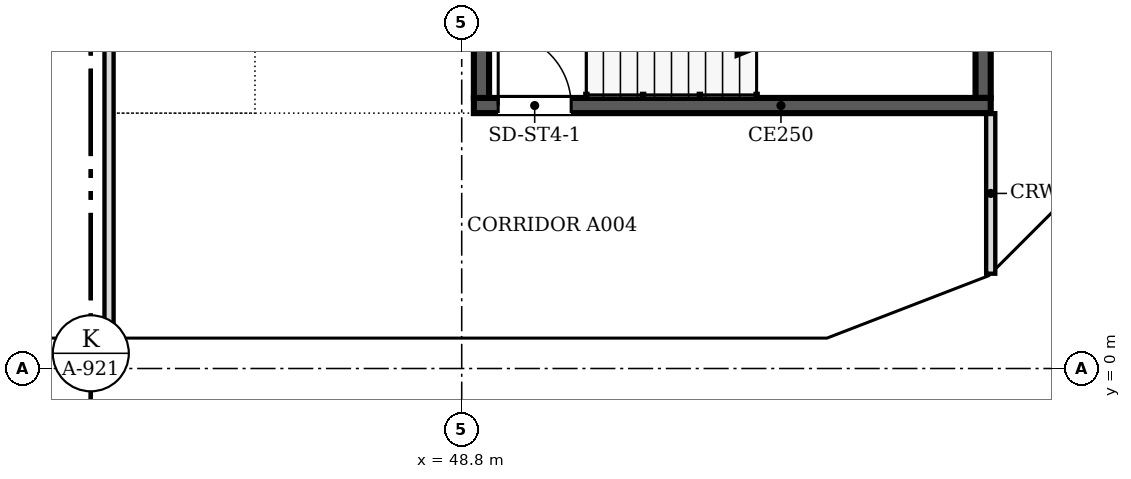
"""IFC4 building model, lengths in metres.
Left out: names, types, materials, properties, quantities, classifications, styles, units other than length and angle.
Written with IfcOpenShell. Run it as: python <this file> out.ifc"""

import sys

from ifc_helpers import new_model, si_unit, direction, frame, frame_2d, origin, place, context, subcontext, project, spatial, polyline, rectangle, outline, extrude, faceted_brep, source, transform, mapped, element, fill, save


model = new_model("IFC4")
c1 = context("Model", 3, precision=1e-05, world=origin(), true_north=direction((0.0, 1.0)))
c2 = subcontext(c1, "Body", "Model", "MODEL_VIEW")
j1 = project(units=[si_unit("LENGTHUNIT", "METRE"), si_unit("PLANEANGLEUNIT", "RADIAN")], contexts=[c1])
p1 = place(None, origin())
s1 = spatial("IfcSite", under=j1, at=p1, CompositionType="ELEMENT")
p2 = place(p1, origin())
s2 = spatial("IfcBuilding", under=s1, at=p2, CompositionType="ELEMENT")
p3 = place(p2, frame((0.0, 0.0, 91.4)))
s3 = spatial("IfcBuildingStorey", under=s2, at=p3, CompositionType="ELEMENT", Elevation=91.4)
m1 = source(origin(), c2, "Body", "SweptSolid", [
    extrude(outline(polyline([(3.05, 0.0), (6.1, 3.8), (3.05, 7.6), (0.0, 3.8), (3.05, 0.0)])), frame((0.0, 0.25, 0.0), z_axis=(0.0, -1.0, 0.0), x_axis=(1.0, 0.0, 0.0)), (0.0, 0.0, 1.0), 0.5),
])
p4 = place(p3, frame((39.65, 0.25, -3.8), z_axis=(0.0, 0.0, 1.0), x_axis=(1.0, 0.0, 0.0)))
e1 = element("IfcWall", 1, at=p4, inside=s3, PredefinedType="SOLIDWALL", context=c2, shape_type="MappedRepresentation", body=[
    mapped(m1, transform((0.0, 0.0, 0.0), scale=1.0)),
])
m2 = source(origin(), c2, "Body", "SweptSolid", [
    extrude(outline(polyline([(3.05, 0.399), (5.78, 3.8), (3.05, 7.2), (0.321, 3.8), (3.05, 0.399)])), frame((0.0, 0.26, 0.0), z_axis=(0.0, -1.0, 0.0), x_axis=(1.0, 0.0, 0.0)), (0.0, 0.0, 1.0), 0.52),
])
p5 = place(p4, origin())
e2 = element("IfcOpeningElement", 2, at=p5, cuts=e1, PredefinedType="OPENING", context=c2, shape_type="MappedRepresentation", body=[
    mapped(m2, transform((0.0, 0.0, 0.0), scale=1.0)),
])
p6 = place(p3, frame((45.75, 0.25, -3.8), z_axis=(0.0, 0.0, 1.0), x_axis=(1.0, 0.0, 0.0)))
e3 = element("IfcWall", 3, at=p6, inside=s3, PredefinedType="SOLIDWALL", context=c2, shape_type="MappedRepresentation", body=[
    mapped(m1, transform((0.0, 0.0, 0.0), scale=1.0)),
])
p7 = place(p6, origin())
e4 = element("IfcOpeningElement", 4, at=p7, cuts=e3, PredefinedType="OPENING", context=c2, shape_type="MappedRepresentation", body=[
    mapped(m2, transform((0.0, 0.0, 0.0), scale=1.0)),
])
m3 = source(origin(), c2, "Body", "Brep", [
    faceted_brep([(3.003, -0.25, 0.0), (3.05, -0.25, 0.06), (3.05, -0.25, 7.54), (3.003, -0.25, 7.6), (0.0, -0.25, 3.8), (0.0, 0.25, 3.8), (2.957, 0.25, 7.541), (2.957, 0.25, 0.059), (3.003, 0.0, 0.0), (3.003, 0.0, 7.6)], [[[0, 1, 2, 3, 4]], [[5, 6, 7]], [[1, 0, 8]], [[9, 3, 2]], [[6, 5, 4, 3, 9]], [[5, 7, 8, 0, 4]], [[1, 8, 7, 6, 9, 2]]]),
])
p8 = place(p3, frame((51.85, 0.25, -3.8), z_axis=(0.0, 0.0, 1.0), x_axis=(1.0, 0.0, 0.0)))
e5 = element("IfcWall", 5, at=p8, inside=s3, PredefinedType="SOLIDWALL", context=c2, shape_type="MappedRepresentation", body=[
    mapped(m3, transform((0.0, 0.0, 0.0), scale=1.0)),
])
m4 = source(origin(), c2, "Body", "SweptSolid", [
    extrude(outline(polyline([(2.803, 6.944), (0.319, 3.8), (2.803, 0.656), (2.803, 6.944)])), frame((0.0, 0.26, 0.0), z_axis=(0.0, -1.0, 0.0), x_axis=(1.0, 0.0, 0.0)), (0.0, 0.0, 1.0), 0.52),
])
p9 = place(p8, origin())
e6 = element("IfcOpeningElement", 6, at=p9, cuts=e5, PredefinedType="OPENING", context=c2, shape_type="MappedRepresentation", body=[
    mapped(m4, transform((0.0, 0.0, 0.0), scale=1.0)),
])
m5 = source(origin(), c2, "Body", "Brep", [
    faceted_brep([(0.047, -0.25, 0.0), (2.997, -0.25, 3.8), (0.047, -0.25, 7.6), (0.0, -0.25, 7.541), (0.0, -0.25, 0.059), (0.093, 0.25, 7.54), (2.944, 0.25, 3.868), (2.944, 0.25, 3.732), (0.093, 0.25, 0.06), (2.997, 0.0, 3.8), (0.047, 0.0, 0.0), (0.047, 0.0, 7.6)], [[[0, 1, 2, 3, 4]], [[5, 6, 7, 8]], [[8, 7, 9, 1, 0, 10]], [[6, 5, 11, 2, 1, 9]], [[3, 2, 11]], [[10, 0, 4]], [[8, 10, 4, 3, 11, 5]], [[9, 7, 6]]]),
])
p10 = place(p3, frame((54.81, 0.233, -3.8), z_axis=(0.0, 0.0, 1.0), x_axis=(0.932990326376, 0.359901446078, 0.0)))
e7 = element("IfcWall", 7, at=p10, inside=s3, PredefinedType="SOLIDWALL", context=c2, shape_type="MappedRepresentation", body=[
    mapped(m5, transform((0.0, 0.0, 0.0), scale=1.0)),
])
m6 = source(origin(), c2, "Body", "SweptSolid", [
    extrude(outline(polyline([(0.247, 0.665), (2.681, 3.8), (0.247, 6.935), (0.247, 0.665)])), frame((0.0, 0.26, 0.0), z_axis=(0.0, -1.0, 0.0), x_axis=(1.0, 0.0, 0.0)), (0.0, 0.0, 1.0), 0.52),
])
p11 = place(p10, origin())
e8 = element("IfcOpeningElement", 8, at=p11, cuts=e7, PredefinedType="OPENING", context=c2, shape_type="MappedRepresentation", body=[
    mapped(m6, transform((0.0, 0.0, 0.0), scale=1.0)),
])
m7 = source(origin(), c2, "Body", "Brep", [
    faceted_brep([(2.944, -0.25, 0.0), (2.997, -0.25, 0.068), (2.997, -0.25, 7.532), (2.944, -0.25, 7.6), (0.0, -0.25, 3.8), (0.053, 0.25, 3.868), (2.891, 0.25, 7.532), (2.891, 0.25, 0.068), (0.053, 0.25, 3.731), (2.944, 0.0, 0.0), (2.944, 0.0, 7.6), (0.0, 0.0, 3.8)], [[[0, 1, 2, 3, 4]], [[5, 6, 7, 8]], [[1, 0, 9]], [[10, 3, 2]], [[6, 5, 11, 4, 3, 10]], [[8, 7, 9, 0, 4, 11]], [[8, 11, 5]], [[1, 9, 7, 6, 10, 2]]]),
])
p12 = place(p3, frame((57.606, 1.312, -3.8), z_axis=(0.0, 0.0, 1.0), x_axis=(0.707147509625, 0.707066050402, 0.0)))
e9 = element("IfcWall", 9, at=p12, inside=s3, PredefinedType="SOLIDWALL", context=c2, shape_type="MappedRepresentation", body=[
    mapped(m7, transform((0.0, 0.0, 0.0), scale=1.0)),
])
m8 = source(origin(), c2, "Body", "SweptSolid", [
    extrude(outline(polyline([(2.744, 6.934), (0.316, 3.8), (2.744, 0.666), (2.744, 6.934)])), frame((0.0, 0.26, 0.0), z_axis=(0.0, -1.0, 0.0), x_axis=(1.0, 0.0, 0.0)), (0.0, 0.0, 1.0), 0.52),
])
p13 = place(p12, origin())
e10 = element("IfcOpeningElement", 10, at=p13, cuts=e9, PredefinedType="OPENING", context=c2, shape_type="MappedRepresentation", body=[
    mapped(m8, transform((0.0, 0.0, 0.0), scale=1.0)),
])
p14 = place(p2, frame((0.0, 0.0, 95.2)))
s4 = spatial("IfcBuildingStorey", under=s2, at=p14, CompositionType="ELEMENT", Elevation=95.2)
m9 = source(origin(), c2, "Body", "Brep", [
    faceted_brep([(3.05, -0.25, 0.0), (6.1, -0.25, 3.8), (6.1, -0.25, 3.8), (3.05, -0.25, 7.6), (0.0, -0.25, 3.8), (0.0, 0.25, 3.8), (3.05, 0.25, 7.6), (6.1, 0.25, 3.8), (6.1, 0.25, 3.8), (3.05, 0.25, 0.0)], [[[0, 1, 2, 3, 4]], [[5, 6, 7, 8, 9]], [[9, 8, 1, 0]], [[7, 6, 3, 2]], [[6, 5, 4, 3]], [[5, 9, 0, 4]], [[1, 8, 7, 2]]]),
])
p15 = place(p14, frame((36.6, 0.25, -3.8), z_axis=(0.0, 0.0, 1.0), x_axis=(1.0, 0.0, 0.0)))
e11 = element("IfcWall", 11, at=p15, inside=s4, PredefinedType="SOLIDWALL", context=c2, shape_type="MappedRepresentation", body=[
    mapped(m9, transform((0.0, 0.0, 0.0), scale=1.0)),
])
m10 = source(origin(), c2, "Body", "SweptSolid", [
    extrude(outline(polyline([(3.05, 0.399), (5.78, 3.8), (3.05, 7.201), (0.321, 3.8), (3.05, 0.399)])), frame((0.0, 0.26, 0.0), z_axis=(0.0, -1.0, 0.0), x_axis=(1.0, 0.0, 0.0)), (0.0, 0.0, 1.0), 0.52),
])
p16 = place(p15, origin())
e12 = element("IfcOpeningElement", 12, at=p16, cuts=e11, PredefinedType="OPENING", context=c2, shape_type="MappedRepresentation", body=[
    mapped(m10, transform((0.0, 0.0, 0.0), scale=1.0)),
])
m11 = source(origin(), c2, "Body", "SweptSolid", [
    extrude(outline(polyline([(3.05, 0.0), (6.1, 3.8), (3.05, 7.6), (0.0, 3.8), (3.05, 0.0)])), frame((0.0, 0.25, 0.0), z_axis=(0.0, -1.0, 0.0), x_axis=(1.0, 0.0, 0.0)), (0.0, 0.0, 1.0), 0.5),
])
p17 = place(p14, frame((42.7, 0.25, -3.8), z_axis=(0.0, 0.0, 1.0), x_axis=(1.0, 0.0, 0.0)))
e13 = element("IfcWall", 13, at=p17, inside=s4, PredefinedType="SOLIDWALL", context=c2, shape_type="MappedRepresentation", body=[
    mapped(m11, transform((0.0, 0.0, 0.0), scale=1.0)),
])
p18 = place(p17, origin())
e14 = element("IfcOpeningElement", 14, at=p18, cuts=e13, PredefinedType="OPENING", context=c2, shape_type="MappedRepresentation", body=[
    mapped(m10, transform((0.0, 0.0, 0.0), scale=1.0)),
])
m12 = source(origin(), c2, "Body", "Brep", [
    faceted_brep([(3.05, -0.25, 0.0), (6.053, -0.25, 3.8), (3.05, -0.25, 7.6), (0.0, -0.25, 3.8), (0.0, 0.25, 3.8), (3.05, 0.25, 7.6), (6.007, 0.25, 3.859), (6.007, 0.25, 3.741), (3.05, 0.25, 0.0), (6.053, 0.0, 3.8)], [[[0, 1, 2, 3]], [[4, 5, 6, 7, 8]], [[8, 7, 9, 1, 0]], [[6, 5, 2, 1, 9]], [[5, 4, 3, 2]], [[4, 8, 0, 3]], [[9, 7, 6]]]),
])
p19 = place(p14, frame((48.8, 0.25, -3.8), z_axis=(0.0, 0.0, 1.0), x_axis=(1.0, 0.0, 0.0)))
e15 = element("IfcWall", 15, at=p19, inside=s4, PredefinedType="SOLIDWALL", context=c2, shape_type="MappedRepresentation", body=[
    mapped(m12, transform((0.0, 0.0, 0.0), scale=1.0)),
])
m13 = source(origin(), c2, "Body", "SweptSolid", [
    extrude(outline(polyline([(3.049, 0.401), (5.735, 3.8), (3.049, 7.199), (0.321, 3.8), (3.049, 0.401)])), frame((0.0, 0.26, 0.0), z_axis=(0.0, -1.0, 0.0), x_axis=(1.0, 0.0, 0.0)), (0.0, 0.0, 1.0), 0.52),
])
p20 = place(p19, origin())
e16 = element("IfcOpeningElement", 16, at=p20, cuts=e15, PredefinedType="OPENING", context=c2, shape_type="MappedRepresentation", body=[
    mapped(m13, transform((0.0, 0.0, 0.0), scale=1.0)),
])
m14 = source(origin(), c2, "Body", "Brep", [
    faceted_brep([(2.95, -0.25, 0.0), (3.003, -0.25, 0.068), (3.003, -0.25, 7.532), (2.95, -0.25, 7.6), (0.0, -0.25, 3.8), (0.047, 0.25, 3.86), (2.898, 0.25, 7.532), (2.898, 0.25, 0.068), (0.047, 0.25, 3.74), (2.95, 0.0, 0.0), (2.95, 0.0, 7.6), (0.0, 0.0, 3.8)], [[[0, 1, 2, 3, 4]], [[5, 6, 7, 8]], [[1, 0, 9]], [[10, 3, 2]], [[6, 5, 11, 4, 3, 10]], [[8, 7, 9, 0, 4, 11]], [[8, 11, 5]], [[1, 9, 7, 6, 10, 2]]]),
])
p21 = place(p14, frame((54.854, 0.25, -3.8), z_axis=(0.0, 0.0, 1.0), x_axis=(0.932970071518, 0.359953949349, 0.0)))
e17 = element("IfcWall", 17, at=p21, inside=s4, PredefinedType="SOLIDWALL", context=c2, shape_type="MappedRepresentation", body=[
    mapped(m14, transform((0.0, 0.0, 0.0), scale=1.0)),
])
m15 = source(origin(), c2, "Body", "SweptSolid", [
    extrude(outline(polyline([(2.75, 6.935), (0.316, 3.8), (2.75, 0.665), (2.75, 6.935)])), frame((0.0, 0.26, 0.0), z_axis=(0.0, -1.0, 0.0), x_axis=(1.0, 0.0, 0.0)), (0.0, 0.0, 1.0), 0.52),
])
p22 = place(p21, origin())
e18 = element("IfcOpeningElement", 18, at=p22, cuts=e17, PredefinedType="OPENING", context=c2, shape_type="MappedRepresentation", body=[
    mapped(m15, transform((0.0, 0.0, 0.0), scale=1.0)),
])
m16 = source(origin(), c2, "Body", "Brep", [
    faceted_brep([(0.053, -0.25, 0.0), (2.997, -0.25, 3.8), (0.053, -0.25, 7.6), (0.0, -0.25, 7.532), (0.0, -0.25, 0.068), (0.106, 0.25, 7.532), (2.944, 0.25, 3.868), (2.944, 0.25, 3.732), (0.106, 0.25, 0.068), (2.997, 0.0, 3.8), (0.053, 0.0, 0.0), (0.053, 0.0, 7.6)], [[[0, 1, 2, 3, 4]], [[5, 6, 7, 8]], [[8, 7, 9, 1, 0, 10]], [[6, 5, 11, 2, 1, 9]], [[3, 2, 11]], [[10, 0, 4]], [[8, 10, 4, 3, 11, 5]], [[9, 7, 6]]]),
])
p23 = place(p14, frame((57.569, 1.274, -3.8), z_axis=(0.0, 0.0, 1.0), x_axis=(0.707066050402, 0.707147509625, 0.0)))
e19 = element("IfcWall", 19, at=p23, inside=s4, PredefinedType="SOLIDWALL", context=c2, shape_type="MappedRepresentation", body=[
    mapped(m16, transform((0.0, 0.0, 0.0), scale=1.0)),
])
m17 = source(origin(), c2, "Body", "SweptSolid", [
    extrude(outline(polyline([(0.253, 0.667), (2.681, 3.8), (0.253, 6.934), (0.253, 0.667)])), frame((0.0, 0.26, 0.0), z_axis=(0.0, -1.0, 0.0), x_axis=(1.0, 0.0, 0.0)), (0.0, 0.0, 1.0), 0.52),
])
p24 = place(p23, origin())
e20 = element("IfcOpeningElement", 20, at=p24, cuts=e19, PredefinedType="OPENING", context=c2, shape_type="MappedRepresentation", body=[
    mapped(m17, transform((0.0, 0.0, 0.0), scale=1.0)),
])
p25 = place(p3, frame((57.5, 4.325, 0.0), z_axis=(0.0, 0.0, 1.0), x_axis=(-1.0, 0.0, 0.0)))
e21 = element("IfcWall", 21, at=p25, inside=s3, PredefinedType="SOLIDWALL", context=c2, shape_type="SweptSolid", body=[
    extrude(rectangle(XDim=8.5, YDim=0.25, at=frame_2d((4.25, 0.0))), origin(), (0.0, 0.0, 1.0), 3.8),
])
m18 = source(origin(), c2, "Body", "SweptSolid", [
    extrude(rectangle(XDim=1.2, YDim=2.1, at=frame_2d((0.6, 1.05))), frame((0.0, 0.135, 0.0), z_axis=(0.0, -1.0, 0.0), x_axis=(1.0, 0.0, 0.0)), (0.0, 0.0, 1.0), 0.27),
])
p26 = place(p25, frame((6.9, 0.0, 0.0)))
e22 = element("IfcOpeningElement", 22, at=p26, cuts=e21, PredefinedType="OPENING", context=c2, shape_type="MappedRepresentation", body=[
    mapped(m18, transform((0.0, 0.0, 0.0), scale=1.0)),
])
for number, where, z_axis, x_axis in (
    (23, (49.125, 4.45, 0.0), (0.0, 0.0, 1.0), (0.0, 1.0, 0.0)),
    (24, (57.375, 7.85, 0.0), (0.0, 0.0, 1.0), (0.0, -1.0, 0.0)),
):
    element("IfcWall", number, at=place(p3, frame(where, z_axis=z_axis, x_axis=x_axis)), inside=s3, PredefinedType="SOLIDWALL", context=c2, shape_type="SweptSolid", body=[
        extrude(rectangle(XDim=3.4, YDim=0.25, at=frame_2d((1.7, 0.0))), origin(), (0.0, 0.0, 1.0), 3.8),
    ])
p27 = place(p3, frame((43.0, 0.5, 0.0), z_axis=(0.0, 0.0, 1.0), x_axis=(0.0, 1.0, 0.0)))
e25 = element("IfcWall", 25, at=p27, inside=s3, PredefinedType="PARTITIONING", context=c2, shape_type="SweptSolid", body=[
    extrude(rectangle(XDim=21.424, YDim=0.15, at=frame_2d((10.712, 0.0))), origin(), (0.0, 0.0, 1.0), 2.895),
])
m19 = source(origin(), c2, "Body", "SweptSolid", [
    extrude(rectangle(XDim=0.9, YDim=2.1, at=frame_2d((0.45, 1.05))), frame((0.0, 0.085, 0.0), z_axis=(0.0, -1.0, 0.0), x_axis=(1.0, 0.0, 0.0)), (0.0, 0.0, 1.0), 0.17),
])
p28 = place(p27, frame((16.601, 0.0, 0.0)))
e26 = element("IfcOpeningElement", 26, at=p28, cuts=e25, PredefinedType="OPENING", context=c2, shape_type="MappedRepresentation", body=[
    mapped(m19, transform((0.0, 0.0, 0.0), scale=1.0)),
])
p29 = place(p27, frame((7.7, 0.0, 0.0)))
e27 = element("IfcOpeningElement", 27, at=p29, cuts=e25, PredefinedType="OPENING", context=c2, shape_type="MappedRepresentation", body=[
    mapped(m19, transform((0.0, 0.0, 0.0), scale=1.0)),
])
p30 = place(p3, frame((57.5, 1.559, 0.0), z_axis=(0.0, 0.0, 1.0), x_axis=(0.0, 1.0, 0.0)))
e28 = element("IfcWall", 28, at=p30, inside=s3, PredefinedType="PARTITIONING", context=c2, shape_type="SweptSolid", body=[
    extrude(rectangle(XDim=2.641, YDim=0.15, at=frame_2d((1.32, 0.0))), origin(), (0.0, 0.0, 1.0), 2.895),
])
m20 = source(origin(), c2, "Body", "SweptSolid", [
    extrude(rectangle(XDim=1.2, YDim=2.1, at=frame_2d((0.6, 1.05))), frame((0.0, 0.025, 0.0), z_axis=(0.0, -1.0, 0.0), x_axis=(1.0, 0.0, 0.0)), (0.0, 0.0, 1.0), 0.05),
])
p31 = place(p26, origin())
e29 = element("IfcDoor", 29, at=p31, inside=s3, OperationType="SINGLE_SWING_RIGHT", PredefinedType="DOOR", context=c2, shape_type="MappedRepresentation", body=[
    mapped(m20, transform((0.0, 0.0, 0.0), scale=1.0)),
])
fill(e22, e29)
save(model, sys.argv[1])
